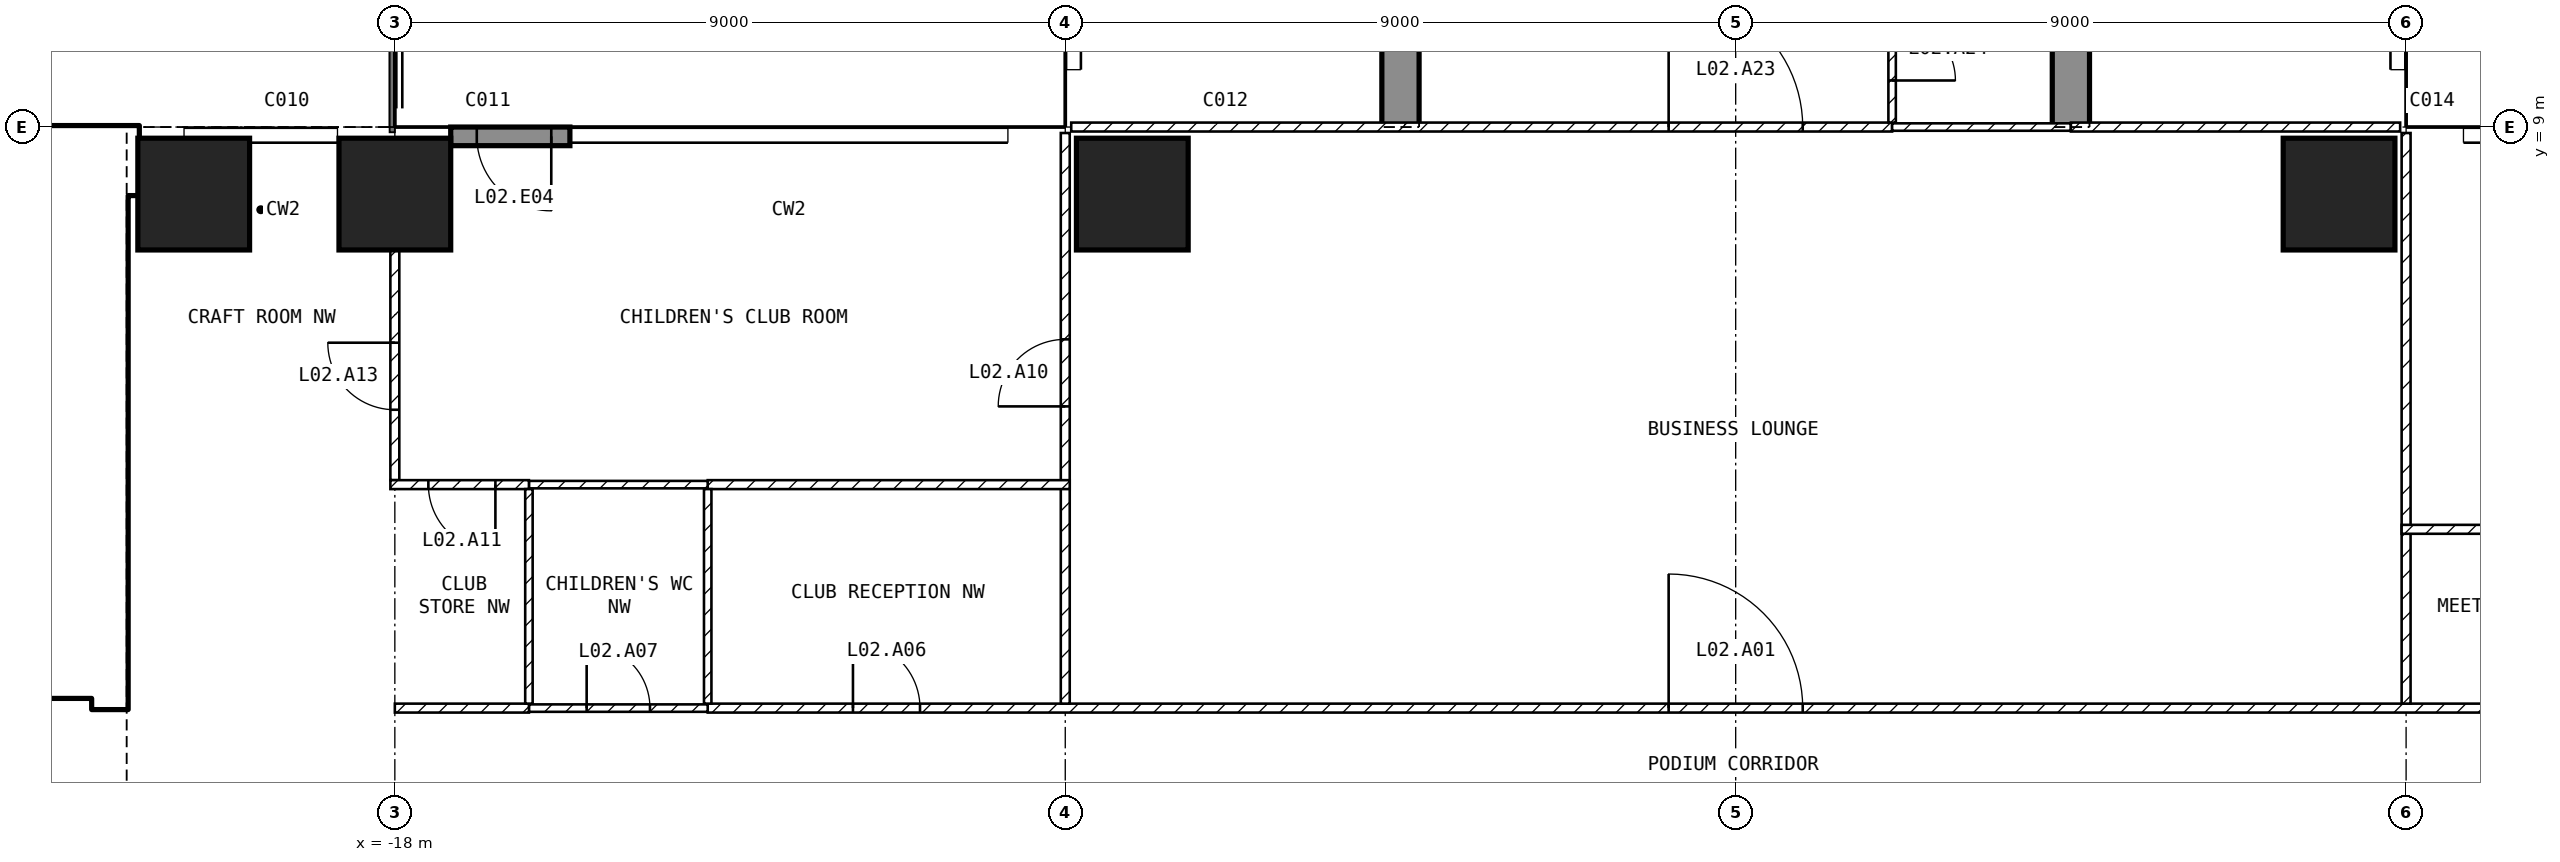
"""IFC4 building model, lengths in metres.
Left out: names, types, materials, properties, quantities, classifications, styles, units other than length and angle.
Written with IfcOpenShell. Run it as: python <this file> out.ifc"""

import sys

from ifc_helpers import new_model, si_unit, direction, frame, frame_2d, origin, origin_2d, place, context, subcontext, project, spatial, polyline, rectangle, outline, extrude, element, fill, save


model = new_model("IFC4")
c1 = context("Model", 3, precision=1e-05, world=origin(), true_north=direction((0.0, 1.0)))
c2 = subcontext(c1, "Body", "Model", "MODEL_VIEW")
j1 = project(units=[si_unit("LENGTHUNIT", "METRE"), si_unit("PLANEANGLEUNIT", "RADIAN")], contexts=[c1])
p1 = place(None, origin())
s1 = spatial("IfcSite", under=j1, at=p1, CompositionType="ELEMENT")
p2 = place(p1, origin())
s2 = spatial("IfcBuilding", under=s1, at=p2, CompositionType="ELEMENT")
p3 = place(p2, frame((0.0, 0.0, 21.0)))
s3 = spatial("IfcBuildingStorey", under=s2, at=p3, CompositionType="ELEMENT", Elevation=21.0)
for number, where, z_axis, x_axis in (
    (1, (-20.7, 8.1, -0.3), (0.0, 0.0, 1.0), (1.0, 0.0, 0.0)),
    (2, (-18.0, 8.1, -0.3), (0.0, 0.0, 1.0), (1.0, 0.0, 0.0)),
):
    element("IfcColumn", number, at=place(p3, frame(where, z_axis=z_axis, x_axis=x_axis)), inside=s3, PredefinedType="COLUMN", context=c2, shape_type="SweptSolid", body=[
        extrude(rectangle(XDim=1.5, YDim=1.5, at=origin_2d()), origin(), (0.0, 0.0, 1.0), 5.85),
    ])
for number, where, z_axis, x_axis in (
    (3, (-8.1, 8.1, -1.4), (0.0, 0.0, 1.0), (1.0, 0.0, 0.0)),
    (4, (8.1, 8.1, -1.4), (0.0, 0.0, 1.0), (1.0, 0.0, 0.0)),
):
    element("IfcColumn", number, at=place(p3, frame(where, z_axis=z_axis, x_axis=x_axis)), inside=s3, PredefinedType="COLUMN", context=c2, shape_type="SweptSolid", body=[
        extrude(rectangle(XDim=1.5, YDim=1.5, at=origin_2d()), origin(), (0.0, 0.0, 1.0), 6.95),
    ])
for number, where, z_axis, x_axis in (
    (5, (-4.75, 9.0, -0.3), (1.0, 0.0, 0.0), (0.0, 1.0, 0.0)),
    (6, (4.25, 9.0, -0.3), (1.0, 0.0, 0.0), (0.0, 1.0, 0.0)),
):
    element("IfcWall", number, at=place(p3, frame(where, z_axis=z_axis, x_axis=x_axis)), inside=s3, PredefinedType="SHEAR", context=c2, shape_type="SweptSolid", body=[
        extrude(outline(polyline([(0.0, 0.0), (2.1, 0.0), (2.1, 2.7), (4.5, 2.7), (4.5, 0.0), (9.9, 0.0), (9.9, 2.7), (12.3, 2.7), (12.3, 0.0), (16.35, 0.0), (16.35, 5.85), (0.0, 5.85), (0.0, 0.0)])), origin(), (0.0, 0.0, 1.0), 0.5),
    ])
p4 = place(p3, frame((-15.65, 8.875, 0.0), z_axis=(0.0, 0.0, 1.0), x_axis=(-1.0, 0.0, 0.0)))
e7 = element("IfcWall", 7, at=p4, inside=s3, PredefinedType="SOLIDWALL", context=c2, shape_type="SweptSolid", body=[
    extrude(rectangle(XDim=1.6, YDim=0.25, at=frame_2d((0.8, 0.0))), origin(), (0.0, 0.0, 1.0), 5.55),
])
p5 = place(p4, frame((0.25, 0.0, 0.0)))
e8 = element("IfcOpeningElement", 8, at=p5, cuts=e7, PredefinedType="OPENING", context=c2, shape_type="SweptSolid", body=[
    extrude(rectangle(XDim=1.0, YDim=2.4, at=frame_2d((0.5, 1.2))), frame((0.0, 0.135, 0.0), z_axis=(0.0, -1.0, 0.0), x_axis=(1.0, 0.0, 0.0)), (0.0, 0.0, 1.0), 0.27),
])
p6 = place(p3, frame((-31.5, 8.55, 0.0), z_axis=(0.0, 0.0, 1.0), x_axis=(1.0, 0.0, 0.0)))
e9 = element("IfcWall", 9, at=p6, inside=s3, PredefinedType="SHEAR", context=c2, shape_type="SweptSolid", body=[
    extrude(rectangle(XDim=10.05, YDim=0.9, at=frame_2d((5.025, 0.0))), origin(), (0.0, 0.0, 1.0), 5.55),
])
p7 = place(p3, frame((-21.825, 1.2, 0.0), z_axis=(0.0, 0.0, 1.0), x_axis=(0.0, 1.0, 0.0)))
e10 = element("IfcWall", 10, at=p7, inside=s3, PredefinedType="SHEAR", context=c2, shape_type="SweptSolid", body=[
    extrude(rectangle(XDim=6.9, YDim=0.45, at=frame_2d((3.45, 0.0))), origin(), (0.0, 0.0, 1.0), 5.55),
])
p8 = place(p3, frame((-35.1, 1.45, 0.0), z_axis=(0.0, 0.0, 1.0), x_axis=(1.0, 0.0, 0.0)))
e11 = element("IfcWall", 11, at=p8, inside=s3, PredefinedType="SOLIDWALL", context=c2, shape_type="SweptSolid", body=[
    extrude(rectangle(XDim=13.05, YDim=0.2, at=frame_2d((6.525, 0.0))), origin(), (0.0, 0.0, 1.0), 5.55),
])
p9 = place(p8, frame((11.3, 0.0, 0.0)))
e12 = element("IfcOpeningElement", 12, at=p9, cuts=e11, PredefinedType="OPENING", context=c2, shape_type="SweptSolid", body=[
    extrude(rectangle(XDim=1.0, YDim=2.1, at=frame_2d((0.5, 1.05))), frame((0.0, 0.11, 0.0), z_axis=(0.0, -1.0, 0.0), x_axis=(1.0, 0.0, 0.0)), (0.0, 0.0, 1.0), 0.22),
])
p10 = place(p8, frame((8.8, 0.0, 0.0)))
e13 = element("IfcOpeningElement", 13, at=p10, cuts=e11, PredefinedType="OPENING", context=c2, shape_type="SweptSolid", body=[
    extrude(rectangle(XDim=1.0, YDim=2.1, at=frame_2d((0.5, 1.05))), frame((0.0, 0.11, 0.0), z_axis=(0.0, -1.0, 0.0), x_axis=(1.0, 0.0, 0.0)), (0.0, 0.0, 1.0), 0.22),
])
p11 = place(p3, frame((-28.35, 5.15, 0.0), z_axis=(0.0, 0.0, 1.0), x_axis=(1.0, 0.0, 0.0)))
e14 = element("IfcWall", 14, at=p11, inside=s3, PredefinedType="SOLIDWALL", context=c2, shape_type="SweptSolid", body=[
    extrude(rectangle(XDim=6.3, YDim=0.2, at=frame_2d((3.15, 0.0))), origin(), (0.0, 0.0, 1.0), 5.55),
])
p12 = place(p11, frame((5.1, 0.0, 0.0)))
e15 = element("IfcOpeningElement", 15, at=p12, cuts=e14, PredefinedType="OPENING", context=c2, shape_type="SweptSolid", body=[
    extrude(rectangle(XDim=1.0, YDim=2.1, at=frame_2d((0.5, 1.05))), frame((0.0, 0.11, 0.0), z_axis=(0.0, -1.0, 0.0), x_axis=(1.0, 0.0, 0.0)), (0.0, 0.0, 1.0), 0.22),
])
p13 = place(p3, frame((-13.8, 1.2, 0.0), z_axis=(0.0, 0.0, 1.0), x_axis=(1.0, 0.0, 0.0)))
e16 = element("IfcWall", 16, at=p13, inside=s3, PredefinedType="PARTITIONING", context=c2, shape_type="SweptSolid", body=[
    extrude(rectangle(XDim=35.4, YDim=0.12, at=frame_2d((17.7, 0.0))), origin(), (0.0, 0.0, 1.0), 5.55),
])
p14 = place(p13, frame((12.9, 0.0, 0.0)))
e17 = element("IfcOpeningElement", 17, at=p14, cuts=e16, PredefinedType="OPENING", context=c2, shape_type="SweptSolid", body=[
    extrude(rectangle(XDim=1.8, YDim=2.1, at=frame_2d((0.9, 1.05))), frame((0.0, 0.07, 0.0), z_axis=(0.0, -1.0, 0.0), x_axis=(1.0, 0.0, 0.0)), (0.0, 0.0, 1.0), 0.14),
])
p15 = place(p13, frame((28.05, 0.0, 0.0)))
e18 = element("IfcOpeningElement", 18, at=p15, cuts=e16, PredefinedType="OPENING", context=c2, shape_type="SweptSolid", body=[
    extrude(rectangle(XDim=0.9, YDim=2.1, at=frame_2d((0.45, 1.05))), frame((0.0, 0.07, 0.0), z_axis=(0.0, -1.0, 0.0), x_axis=(1.0, 0.0, 0.0)), (0.0, 0.0, 1.0), 0.14),
])
p16 = place(p13, frame((1.95, 0.0, 0.0)))
e19 = element("IfcOpeningElement", 19, at=p16, cuts=e16, PredefinedType="OPENING", context=c2, shape_type="SweptSolid", body=[
    extrude(rectangle(XDim=0.9, YDim=2.1, at=frame_2d((0.45, 1.05))), frame((0.0, 0.07, 0.0), z_axis=(0.0, -1.0, 0.0), x_axis=(1.0, 0.0, 0.0)), (0.0, 0.0, 1.0), 0.14),
])
p17 = place(p3, frame((-16.2, 1.2, 0.0), z_axis=(0.0, 0.0, 1.0), x_axis=(1.0, 0.0, 0.0)))
e20 = element("IfcWall", 20, at=p17, inside=s3, PredefinedType="PARTITIONING", context=c2, shape_type="SweptSolid", body=[
    extrude(rectangle(XDim=2.4, YDim=0.1, at=frame_2d((1.2, 0.0))), origin(), (0.0, 0.0, 1.0), 5.55),
])
p18 = place(p17, frame((0.775, 0.0, 0.0)))
e21 = element("IfcOpeningElement", 21, at=p18, cuts=e20, PredefinedType="OPENING", context=c2, shape_type="SweptSolid", body=[
    extrude(rectangle(XDim=0.85, YDim=2.1, at=frame_2d((0.425, 1.05))), frame((0.0, 0.06, 0.0), z_axis=(0.0, -1.0, 0.0), x_axis=(1.0, 0.0, 0.0)), (0.0, 0.0, 1.0), 0.12),
])
p19 = place(p3, frame((-18.0, 1.2, 0.0), z_axis=(0.0, 0.0, 1.0), x_axis=(1.0, 0.0, 0.0)))
e22 = element("IfcWall", 22, at=p19, inside=s3, PredefinedType="PARTITIONING", context=c2, shape_type="SweptSolid", body=[
    extrude(rectangle(XDim=1.8, YDim=0.12, at=frame_2d((0.9, 0.0))), origin(), (0.0, 0.0, 1.0), 5.55),
])
p20 = place(p3, frame((9.0, 8.92, 0.0), z_axis=(0.0, 0.0, 1.0), x_axis=(0.0, -1.0, 0.0)))
e23 = element("IfcWall", 23, at=p20, inside=s3, PredefinedType="PARTITIONING", context=c2, shape_type="SweptSolid", body=[
    extrude(rectangle(XDim=7.66, YDim=0.12, at=frame_2d((3.83, 0.0))), origin(), (0.0, 0.0, 1.0), 5.55),
])
p21 = place(p3, frame((-9.0, 1.26, 0.0), z_axis=(0.0, 0.0, 1.0), x_axis=(0.0, 1.0, 0.0)))
e24 = element("IfcWall", 24, at=p21, inside=s3, PredefinedType="PARTITIONING", context=c2, shape_type="SweptSolid", body=[
    extrude(rectangle(XDim=7.66, YDim=0.12, at=frame_2d((3.83, 0.0))), origin(), (0.0, 0.0, 1.0), 5.55),
])
p22 = place(p21, frame((3.99, 0.0, 0.0)))
e25 = element("IfcOpeningElement", 25, at=p22, cuts=e24, PredefinedType="OPENING", context=c2, shape_type="SweptSolid", body=[
    extrude(rectangle(XDim=0.9, YDim=2.1, at=frame_2d((0.45, 1.05))), frame((0.0, 0.07, 0.0), z_axis=(0.0, -1.0, 0.0), x_axis=(1.0, 0.0, 0.0)), (0.0, 0.0, 1.0), 0.14),
])
p23 = place(p3, frame((-8.92, 9.0, 0.0), z_axis=(0.0, 0.0, 1.0), x_axis=(1.0, 0.0, 0.0)))
e26 = element("IfcWall", 26, at=p23, inside=s3, PredefinedType="PARTITIONING", context=c2, shape_type="SweptSolid", body=[
    extrude(rectangle(XDim=11.02, YDim=0.12, at=frame_2d((5.51, 0.0))), origin(), (0.0, 0.0, 1.0), 5.55),
])
p24 = place(p23, frame((8.02, 0.0, 0.0)))
e27 = element("IfcOpeningElement", 27, at=p24, cuts=e26, PredefinedType="OPENING", context=c2, shape_type="SweptSolid", body=[
    extrude(rectangle(XDim=1.8, YDim=2.1, at=frame_2d((0.9, 1.05))), frame((0.0, 0.07, 0.0), z_axis=(0.0, -1.0, 0.0), x_axis=(1.0, 0.0, 0.0)), (0.0, 0.0, 1.0), 0.14),
])
p25 = place(p3, frame((2.1, 9.0, 0.0), z_axis=(0.0, 0.0, 1.0), x_axis=(1.0, 0.0, 0.0)))
e28 = element("IfcWall", 28, at=p25, inside=s3, PredefinedType="PARTITIONING", context=c2, shape_type="SweptSolid", body=[
    extrude(rectangle(XDim=2.4, YDim=0.1, at=frame_2d((1.2, 0.0))), origin(), (0.0, 0.0, 1.0), 5.55),
])
p26 = place(p3, frame((4.5, 9.0, 0.0), z_axis=(0.0, 0.0, 1.0), x_axis=(1.0, 0.0, 0.0)))
e29 = element("IfcWall", 29, at=p26, inside=s3, PredefinedType="PARTITIONING", context=c2, shape_type="SweptSolid", body=[
    extrude(rectangle(XDim=4.42, YDim=0.12, at=frame_2d((2.21, 0.0))), origin(), (0.0, 0.0, 1.0), 5.55),
])
p27 = place(p3, frame((21.6, 3.6, 0.0), z_axis=(0.0, 0.0, 1.0), x_axis=(-1.0, 0.0, 0.0)))
e30 = element("IfcWall", 30, at=p27, inside=s3, PredefinedType="PARTITIONING", context=c2, shape_type="SweptSolid", body=[
    extrude(rectangle(XDim=12.66, YDim=0.12, at=frame_2d((6.33, 0.0))), origin(), (0.0, 0.0, 1.0), 5.55),
])
p28 = place(p27, frame((6.45, 0.0, 0.0)))
e31 = element("IfcOpeningElement", 31, at=p28, cuts=e30, PredefinedType="OPENING", context=c2, shape_type="SweptSolid", body=[
    extrude(rectangle(XDim=0.9, YDim=2.1, at=frame_2d((0.45, 1.05))), frame((0.0, 0.07, 0.0), z_axis=(0.0, -1.0, 0.0), x_axis=(1.0, 0.0, 0.0)), (0.0, 0.0, 1.0), 0.14),
])
p29 = place(p3, frame((-18.0, 4.26, 0.0), z_axis=(0.0, 0.0, 1.0), x_axis=(0.0, 1.0, 0.0)))
e32 = element("IfcWall", 32, at=p29, inside=s3, PredefinedType="PARTITIONING", context=c2, shape_type="SweptSolid", body=[
    extrude(rectangle(XDim=3.09, YDim=0.12, at=frame_2d((1.545, 0.0))), origin(), (0.0, 0.0, 1.0), 4.57),
])
p30 = place(p29, frame((0.945, 0.0, 0.0)))
e33 = element("IfcOpeningElement", 33, at=p30, cuts=e32, PredefinedType="OPENING", context=c2, shape_type="SweptSolid", body=[
    extrude(rectangle(XDim=0.9, YDim=2.1, at=frame_2d((0.45, 1.05))), frame((0.0, 0.07, 0.0), z_axis=(0.0, -1.0, 0.0), x_axis=(1.0, 0.0, 0.0)), (0.0, 0.0, 1.0), 0.14),
])
p31 = place(p3, frame((-8.94, 4.2, 0.0), z_axis=(0.0, 0.0, 1.0), x_axis=(-1.0, 0.0, 0.0)))
e34 = element("IfcWall", 34, at=p31, inside=s3, PredefinedType="PARTITIONING", context=c2, shape_type="SweptSolid", body=[
    extrude(rectangle(XDim=4.86, YDim=0.12, at=frame_2d((2.43, 0.0))), origin(), (0.0, 0.0, 1.0), 5.55),
])
p32 = place(p3, frame((-13.8, 4.2, 0.0), z_axis=(0.0, 0.0, 1.0), x_axis=(-1.0, 0.0, 0.0)))
e35 = element("IfcWall", 35, at=p32, inside=s3, PredefinedType="PARTITIONING", context=c2, shape_type="SweptSolid", body=[
    extrude(rectangle(XDim=2.4, YDim=0.1, at=frame_2d((1.2, 0.0))), origin(), (0.0, 0.0, 1.0), 5.55),
])
p33 = place(p3, frame((-16.2, 4.2, 0.0), z_axis=(0.0, 0.0, 1.0), x_axis=(-1.0, 0.0, 0.0)))
e36 = element("IfcWall", 36, at=p33, inside=s3, PredefinedType="PARTITIONING", context=c2, shape_type="SweptSolid", body=[
    extrude(rectangle(XDim=1.86, YDim=0.12, at=frame_2d((0.93, 0.0))), origin(), (0.0, 0.0, 1.0), 5.55),
])
p34 = place(p33, frame((0.45, 0.0, 0.0)))
e37 = element("IfcOpeningElement", 37, at=p34, cuts=e36, PredefinedType="OPENING", context=c2, shape_type="SweptSolid", body=[
    extrude(rectangle(XDim=0.9, YDim=2.1, at=frame_2d((0.45, 1.05))), frame((0.0, 0.07, 0.0), z_axis=(0.0, -1.0, 0.0), x_axis=(1.0, 0.0, 0.0)), (0.0, 0.0, 1.0), 0.14),
])
for number, where, z_axis, x_axis in (
    (38, (-13.8, 1.26, 0.0), (0.0, 0.0, 1.0), (0.0, 1.0, 0.0)),
    (39, (-16.2, 1.26, 0.0), (0.0, 0.0, 1.0), (0.0, 1.0, 0.0)),
):
    element("IfcWall", number, at=place(p3, frame(where, z_axis=z_axis, x_axis=x_axis)), inside=s3, PredefinedType="PARTITIONING", context=c2, shape_type="SweptSolid", body=[
        extrude(rectangle(XDim=2.88, YDim=0.1, at=frame_2d((1.44, 0.0))), origin(), (0.0, 0.0, 1.0), 5.55),
    ])
p35 = place(p3, frame((2.1, 11.04, 0.0), z_axis=(0.0, 0.0, 1.0), x_axis=(0.0, -1.0, 0.0)))
e40 = element("IfcWall", 40, at=p35, inside=s3, PredefinedType="PARTITIONING", context=c2, shape_type="SweptSolid", body=[
    extrude(rectangle(XDim=1.98, YDim=0.1, at=frame_2d((0.99, 0.0))), origin(), (0.0, 0.0, 1.0), 5.55),
])
p36 = place(p35, frame((0.565, 0.0, 0.0)))
e41 = element("IfcOpeningElement", 41, at=p36, cuts=e40, PredefinedType="OPENING", context=c2, shape_type="SweptSolid", body=[
    extrude(rectangle(XDim=0.85, YDim=2.1, at=frame_2d((0.425, 1.05))), frame((0.0, 0.06, 0.0), z_axis=(0.0, -1.0, 0.0), x_axis=(1.0, 0.0, 0.0)), (0.0, 0.0, 1.0), 0.12),
])
p37 = place(p5, origin())
e42 = element("IfcDoor", 42, at=p37, inside=s3, OperationType="SINGLE_SWING_LEFT", PredefinedType="DOOR", context=c2, shape_type="SweptSolid", body=[
    extrude(rectangle(XDim=1.0, YDim=2.4, at=frame_2d((0.5, 1.2))), frame((0.0, 0.025, 0.0), z_axis=(0.0, -1.0, 0.0), x_axis=(1.0, 0.0, 0.0)), (0.0, 0.0, 1.0), 0.05),
])
fill(e8, e42)
p38 = place(p12, origin())
e43 = element("IfcDoor", 43, at=p38, inside=s3, OperationType="SINGLE_SWING_LEFT", PredefinedType="DOOR", context=c2, shape_type="SweptSolid", body=[
    extrude(rectangle(XDim=1.0, YDim=2.1, at=frame_2d((0.5, 1.05))), frame((0.0, 0.025, 0.0), z_axis=(0.0, -1.0, 0.0), x_axis=(1.0, 0.0, 0.0)), (0.0, 0.0, 1.0), 0.05),
])
fill(e15, e43)
p39 = place(p14, origin())
e44 = element("IfcDoor", 44, at=p39, inside=s3, OperationType="SINGLE_SWING_LEFT", PredefinedType="DOOR", context=c2, shape_type="SweptSolid", body=[
    extrude(rectangle(XDim=1.8, YDim=2.1, at=frame_2d((0.9, 1.05))), frame((0.0, 0.025, 0.0), z_axis=(0.0, -1.0, 0.0), x_axis=(1.0, 0.0, 0.0)), (0.0, 0.0, 1.0), 0.05),
])
fill(e17, e44)
p40 = place(p16, origin())
e45 = element("IfcDoor", 45, at=p40, inside=s3, OperationType="SINGLE_SWING_LEFT", PredefinedType="DOOR", context=c2, shape_type="SweptSolid", body=[
    extrude(rectangle(XDim=0.9, YDim=2.1, at=frame_2d((0.45, 1.05))), frame((0.0, 0.025, 0.0), z_axis=(0.0, -1.0, 0.0), x_axis=(1.0, 0.0, 0.0)), (0.0, 0.0, 1.0), 0.05),
])
fill(e19, e45)
p41 = place(p18, origin())
e46 = element("IfcDoor", 46, at=p41, inside=s3, OperationType="SINGLE_SWING_LEFT", PredefinedType="DOOR", context=c2, shape_type="SweptSolid", body=[
    extrude(rectangle(XDim=0.85, YDim=2.1, at=frame_2d((0.425, 1.05))), frame((0.0, 0.025, 0.0), z_axis=(0.0, -1.0, 0.0), x_axis=(1.0, 0.0, 0.0)), (0.0, 0.0, 1.0), 0.05),
])
fill(e21, e46)
p42 = place(p22, origin())
e47 = element("IfcDoor", 47, at=p42, inside=s3, OperationType="SINGLE_SWING_LEFT", PredefinedType="DOOR", context=c2, shape_type="SweptSolid", body=[
    extrude(rectangle(XDim=0.9, YDim=2.1, at=frame_2d((0.45, 1.05))), frame((0.0, 0.025, 0.0), z_axis=(0.0, -1.0, 0.0), x_axis=(1.0, 0.0, 0.0)), (0.0, 0.0, 1.0), 0.05),
])
fill(e25, e47)
p43 = place(p34, origin())
e48 = element("IfcDoor", 48, at=p43, inside=s3, OperationType="SINGLE_SWING_LEFT", PredefinedType="DOOR", context=c2, shape_type="SweptSolid", body=[
    extrude(rectangle(XDim=0.9, YDim=2.1, at=frame_2d((0.45, 1.05))), frame((0.0, 0.025, 0.0), z_axis=(0.0, -1.0, 0.0), x_axis=(1.0, 0.0, 0.0)), (0.0, 0.0, 1.0), 0.05),
])
fill(e37, e48)
p44 = place(p30, origin())
e49 = element("IfcDoor", 49, at=p44, inside=s3, OperationType="SINGLE_SWING_RIGHT", PredefinedType="DOOR", context=c2, shape_type="SweptSolid", body=[
    extrude(rectangle(XDim=0.9, YDim=2.1, at=frame_2d((0.45, 1.05))), frame((0.0, 0.025, 0.0), z_axis=(0.0, -1.0, 0.0), x_axis=(1.0, 0.0, 0.0)), (0.0, 0.0, 1.0), 0.05),
])
fill(e33, e49)
p45 = place(p24, origin())
e50 = element("IfcDoor", 50, at=p45, inside=s3, OperationType="SINGLE_SWING_LEFT", PredefinedType="DOOR", context=c2, shape_type="SweptSolid", body=[
    extrude(rectangle(XDim=1.8, YDim=2.1, at=frame_2d((0.9, 1.05))), frame((0.0, 0.025, 0.0), z_axis=(0.0, -1.0, 0.0), x_axis=(1.0, 0.0, 0.0)), (0.0, 0.0, 1.0), 0.05),
])
fill(e27, e50)
p46 = place(p36, origin())
e51 = element("IfcDoor", 51, at=p46, inside=s3, OperationType="SINGLE_SWING_RIGHT", PredefinedType="DOOR", context=c2, shape_type="SweptSolid", body=[
    extrude(rectangle(XDim=0.85, YDim=2.1, at=frame_2d((0.425, 1.05))), frame((0.0, 0.025, 0.0), z_axis=(0.0, -1.0, 0.0), x_axis=(1.0, 0.0, 0.0)), (0.0, 0.0, 1.0), 0.05),
])
fill(e41, e51)
save(model, sys.argv[1])
